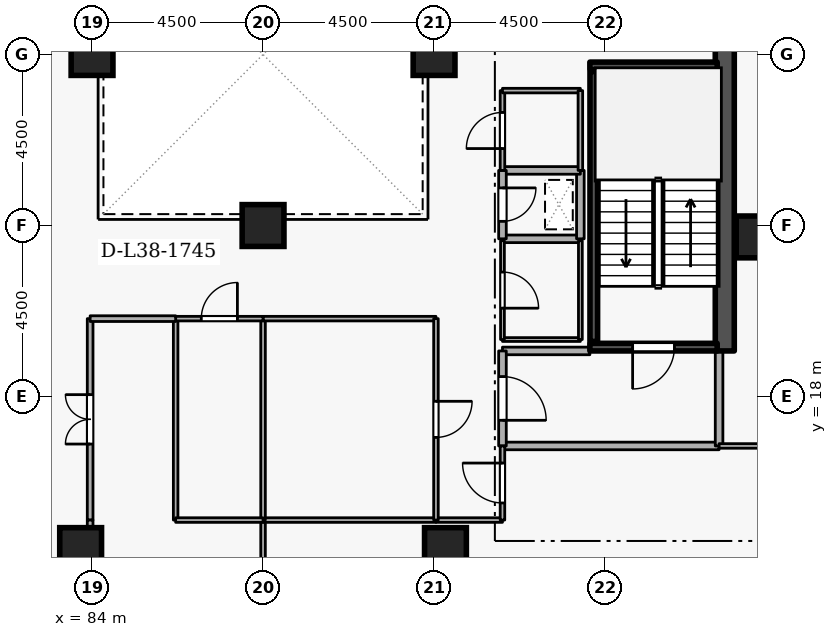
"""IFC4 building model, lengths in metres.
Left out: names, types, materials, properties, quantities, classifications, styles, units other than length and angle.
Written with IfcOpenShell. Run it as: python <this file> out.ifc"""

import sys

from ifc_helpers import new_model, si_unit, direction, frame, frame_2d, origin, origin_2d, place, context, subcontext, project, spatial, rectangle, extrude, element, fill, save


model = new_model("IFC4")
c1 = context("Model", 3, precision=1e-05, world=origin(), true_north=direction((0.0, 1.0)))
c2 = subcontext(c1, "Body", "Model", "MODEL_VIEW")
j1 = project(units=[si_unit("LENGTHUNIT", "METRE"), si_unit("PLANEANGLEUNIT", "RADIAN")], contexts=[c1])
p1 = place(None, origin())
s1 = spatial("IfcSite", under=j1, at=p1, CompositionType="ELEMENT")
p2 = place(p1, origin())
s2 = spatial("IfcBuilding", under=s1, at=p2, CompositionType="ELEMENT")
p3 = place(p2, frame((0.0, 0.0, 145.5)))
s3 = spatial("IfcBuildingStorey", under=s2, at=p3, CompositionType="ELEMENT", Elevation=145.5)
p4 = place(p3, frame((100.65, 19.2, 0.0), z_axis=(0.0, 0.0, 1.0), x_axis=(0.0, 1.0, 0.0)))
e1 = element("IfcWall", 1, at=p4, inside=s3, PredefinedType="SHEAR", context=c2, shape_type="SweptSolid", body=[
    extrude(rectangle(XDim=15.6, YDim=0.5, at=frame_2d((7.8, 0.0))), origin(), (0.0, 0.0, 1.0), 3.6),
])
for number, where, z_axis, x_axis in (
    (2, (93.3, 14.0, 0.0), (0.0, 0.0, 1.0), (1.0, 0.0, 0.0)),
    (3, (83.7, 14.0, 0.0), (0.0, 0.0, 1.0), (1.0, 0.0, 0.0)),
    (4, (101.5, 22.2, 0.0), (0.0, 0.0, 1.0), (1.0, 0.0, 0.0)),
    (5, (93.0, 27.0, 0.0), (0.0, 0.0, 1.0), (1.0, 0.0, 0.0)),
    (6, (84.0, 27.0, 0.0), (0.0, 0.0, 1.0), (1.0, 0.0, 0.0)),
    (7, (88.5, 22.5, 0.0), (0.0, 0.0, 1.0), (1.0, 0.0, 0.0)),
):
    element("IfcColumn", number, at=place(p3, frame(where, z_axis=z_axis, x_axis=x_axis)), inside=s3, PredefinedType="COLUMN", context=c2, shape_type="SweptSolid", body=[
        extrude(rectangle(XDim=1.1, YDim=1.1, at=origin_2d()), origin(), (0.0, 0.0, 1.0), 3.6),
    ])
p5 = place(p3, frame((100.45, 19.3, 0.0), z_axis=(0.0, 0.0, 1.0), x_axis=(-1.0, 0.0, 0.0)))
e8 = element("IfcWall", 8, at=p5, inside=s3, PredefinedType="SHEAR", context=c2, shape_type="SweptSolid", body=[
    extrude(rectangle(XDim=3.35, YDim=0.2, at=frame_2d((1.675, 0.0))), origin(), (0.0, 0.0, 1.0), 3.6),
])
p6 = place(p5, frame((1.125, 0.0, 0.0)))
e9 = element("IfcOpeningElement", 9, at=p6, cuts=e8, PredefinedType="OPENING", context=c2, shape_type="SweptSolid", body=[
    extrude(rectangle(XDim=1.1, YDim=2.1, at=frame_2d((0.55, 1.05))), frame((0.0, 0.11, 0.0), z_axis=(0.0, -1.0, 0.0), x_axis=(1.0, 0.0, 0.0)), (0.0, 0.0, 1.0), 0.22),
])
p7 = place(p3, frame((97.1, 26.7, 0.0), z_axis=(0.0, 0.0, 1.0), x_axis=(1.0, 0.0, 0.0)))
e10 = element("IfcWall", 10, at=p7, inside=s3, PredefinedType="SHEAR", context=c2, shape_type="SweptSolid", body=[
    extrude(rectangle(XDim=3.35, YDim=0.2, at=frame_2d((1.675, 0.0))), origin(), (0.0, 0.0, 1.0), 3.6),
])
p8 = place(p3, frame((97.203, 26.55, 0.0), z_axis=(0.0, 0.0, 1.0), x_axis=(0.0, -1.0, 0.0)))
e11 = element("IfcWall", 11, at=p8, inside=s3, PredefinedType="SHEAR", context=c2, shape_type="SweptSolid", body=[
    extrude(rectangle(XDim=7.1, YDim=0.2, at=frame_2d((3.55, 0.0))), origin(), (0.0, 0.0, 1.0), 3.6),
])
p9 = place(p3, frame((94.8, 16.7, 0.0), z_axis=(0.0, 0.0, 1.0), x_axis=(1.0, 0.0, 0.0)))
e12 = element("IfcWall", 12, at=p9, inside=s3, PredefinedType="STANDARD", context=c2, shape_type="SweptSolid", body=[
    extrude(rectangle(XDim=5.7, YDim=0.2, at=frame_2d((2.85, 0.0))), origin(), (0.0, 0.0, 1.0), 3.3),
])
p10 = place(p3, frame((100.5, 16.7, 0.0), z_axis=(0.0, 0.0, 1.0), x_axis=(0.0, 1.0, 0.0)))
e13 = element("IfcWall", 13, at=p10, inside=s3, PredefinedType="STANDARD", context=c2, shape_type="SweptSolid", body=[
    extrude(rectangle(XDim=2.5, YDim=0.2, at=frame_2d((1.25, 0.0))), origin(), (0.0, 0.0, 1.0), 3.3),
])
p11 = place(p3, frame((97.1, 19.2, 0.0), z_axis=(0.0, 0.0, 1.0), x_axis=(-1.0, 0.0, 0.0)))
e14 = element("IfcWall", 14, at=p11, inside=s3, PredefinedType="STANDARD", context=c2, shape_type="SweptSolid", body=[
    extrude(rectangle(XDim=2.3, YDim=0.2, at=frame_2d((1.15, 0.0))), origin(), (0.0, 0.0, 1.0), 2.505),
])
p12 = place(p3, frame((94.8, 19.2, 0.0), z_axis=(0.0, 0.0, 1.0), x_axis=(0.0, -1.0, 0.0)))
e15 = element("IfcWall", 15, at=p12, inside=s3, PredefinedType="STANDARD", context=c2, shape_type="SweptSolid", body=[
    extrude(rectangle(XDim=2.5, YDim=0.2, at=frame_2d((1.25, 0.0))), origin(), (0.0, 0.0, 1.0), 3.3),
])
p13 = place(p12, frame((0.675, 0.0, 0.0)))
e16 = element("IfcOpeningElement", 16, at=p13, cuts=e15, PredefinedType="OPENING", context=c2, shape_type="SweptSolid", body=[
    extrude(rectangle(XDim=1.15, YDim=2.1, at=frame_2d((0.575, 1.05))), frame((0.0, 0.11, 0.0), z_axis=(0.0, -1.0, 0.0), x_axis=(1.0, 0.0, 0.0)), (0.0, 0.0, 1.0), 0.22),
])
p14 = place(p3, frame((94.8, 22.15, 0.0), z_axis=(0.0, 0.0, 1.0), x_axis=(1.0, 0.0, 0.0)))
e17 = element("IfcWall", 17, at=p14, inside=s3, PredefinedType="STANDARD", context=c2, shape_type="SweptSolid", body=[
    extrude(rectangle(XDim=2.05, YDim=0.2, at=frame_2d((1.025, 0.0))), origin(), (0.0, 0.0, 1.0), 3.3),
])
p15 = place(p3, frame((96.85, 22.15, 0.0), z_axis=(0.0, 0.0, 1.0), x_axis=(0.0, 1.0, 0.0)))
e18 = element("IfcWall", 18, at=p15, inside=s3, PredefinedType="STANDARD", context=c2, shape_type="SweptSolid", body=[
    extrude(rectangle(XDim=1.8, YDim=0.2, at=frame_2d((0.9, 0.0))), origin(), (0.0, 0.0, 1.0), 3.3),
])
p16 = place(p3, frame((96.85, 23.95, 0.0), z_axis=(0.0, 0.0, 1.0), x_axis=(-1.0, 0.0, 0.0)))
e19 = element("IfcWall", 19, at=p16, inside=s3, PredefinedType="STANDARD", context=c2, shape_type="SweptSolid", body=[
    extrude(rectangle(XDim=2.05, YDim=0.2, at=frame_2d((1.025, 0.0))), origin(), (0.0, 0.0, 1.0), 3.3),
])
p17 = place(p3, frame((94.8, 23.95, 0.0), z_axis=(0.0, 0.0, 1.0), x_axis=(0.0, -1.0, 0.0)))
e20 = element("IfcWall", 20, at=p17, inside=s3, PredefinedType="STANDARD", context=c2, shape_type="SweptSolid", body=[
    extrude(rectangle(XDim=1.8, YDim=0.2, at=frame_2d((0.9, 0.0))), origin(), (0.0, 0.0, 1.0), 3.3),
])
p18 = place(p17, frame((0.46, 0.0, 0.0)))
e21 = element("IfcOpeningElement", 21, at=p18, cuts=e20, PredefinedType="OPENING", context=c2, shape_type="SweptSolid", body=[
    extrude(rectangle(XDim=0.88, YDim=2.04, at=frame_2d((0.44, 1.02))), frame((0.0, 0.11, 0.0), z_axis=(0.0, -1.0, 0.0), x_axis=(1.0, 0.0, 0.0)), (0.0, 0.0, 1.0), 0.22),
])
p19 = place(p3, frame((94.8, 19.5, 0.0), z_axis=(0.0, 0.0, 1.0), x_axis=(1.0, 0.0, 0.0)))
e22 = element("IfcWall", 22, at=p19, inside=s3, PredefinedType="PARTITIONING", context=c2, shape_type="SweptSolid", body=[
    extrude(rectangle(XDim=2.05, YDim=0.1, at=frame_2d((1.025, 0.0))), origin(), (0.0, 0.0, 1.0), 2.505),
])
p20 = place(p3, frame((96.85, 19.5, 0.0), z_axis=(0.0, 0.0, 1.0), x_axis=(0.0, 1.0, 0.0)))
e23 = element("IfcWall", 23, at=p20, inside=s3, PredefinedType="PARTITIONING", context=c2, shape_type="SweptSolid", body=[
    extrude(rectangle(XDim=2.6, YDim=0.1, at=frame_2d((1.3, 0.0))), origin(), (0.0, 0.0, 1.0), 3.3),
])
p21 = place(p3, frame((94.8, 22.1, 0.0), z_axis=(0.0, 0.0, 1.0), x_axis=(0.0, -1.0, 0.0)))
e24 = element("IfcWall", 24, at=p21, inside=s3, PredefinedType="PARTITIONING", context=c2, shape_type="SweptSolid", body=[
    extrude(rectangle(XDim=2.6, YDim=0.1, at=frame_2d((1.3, 0.0))), origin(), (0.0, 0.0, 1.0), 3.3),
])
p22 = place(p21, frame((0.825, 0.0, 0.0)))
e25 = element("IfcOpeningElement", 25, at=p22, cuts=e24, PredefinedType="OPENING", context=c2, shape_type="SweptSolid", body=[
    extrude(rectangle(XDim=0.95, YDim=2.1, at=frame_2d((0.475, 1.05))), frame((0.0, 0.06, 0.0), z_axis=(0.0, -1.0, 0.0), x_axis=(1.0, 0.0, 0.0)), (0.0, 0.0, 1.0), 0.12),
])
p23 = place(p3, frame((94.8, 23.95, 0.0), z_axis=(0.0, 0.0, 1.0), x_axis=(0.0, 1.0, 0.0)))
e26 = element("IfcWall", 26, at=p23, inside=s3, PredefinedType="PARTITIONING", context=c2, shape_type="SweptSolid", body=[
    extrude(rectangle(XDim=2.1, YDim=0.12, at=frame_2d((1.05, 0.0))), origin(), (0.0, 0.0, 1.0), 3.3),
])
p24 = place(p23, frame((0.575, 0.0, 0.0)))
e27 = element("IfcOpeningElement", 27, at=p24, cuts=e26, PredefinedType="OPENING", context=c2, shape_type="SweptSolid", body=[
    extrude(rectangle(XDim=0.95, YDim=2.1, at=frame_2d((0.475, 1.05))), frame((0.0, 0.07, 0.0), z_axis=(0.0, -1.0, 0.0), x_axis=(1.0, 0.0, 0.0)), (0.0, 0.0, 1.0), 0.14),
])
p25 = place(p3, frame((94.8, 26.05, 0.0), z_axis=(0.0, 0.0, 1.0), x_axis=(1.0, 0.0, 0.0)))
e28 = element("IfcWall", 28, at=p25, inside=s3, PredefinedType="PARTITIONING", context=c2, shape_type="SweptSolid", body=[
    extrude(rectangle(XDim=2.05, YDim=0.12, at=frame_2d((1.025, 0.0))), origin(), (0.0, 0.0, 1.0), 3.3),
])
p26 = place(p3, frame((96.85, 26.05, 0.0), z_axis=(0.0, 0.0, 1.0), x_axis=(0.0, -1.0, 0.0)))
e29 = element("IfcWall", 29, at=p26, inside=s3, PredefinedType="PARTITIONING", context=c2, shape_type="SweptSolid", body=[
    extrude(rectangle(XDim=2.1, YDim=0.12, at=frame_2d((1.05, 0.0))), origin(), (0.0, 0.0, 1.0), 3.3),
])
p27 = place(p3, frame((88.5, 3.28, 0.0), z_axis=(0.0, 0.0, 1.0), x_axis=(0.0, 1.0, 0.0)))
e30 = element("IfcWall", 30, at=p27, inside=s3, PredefinedType="PARTITIONING", context=c2, shape_type="SweptSolid", body=[
    extrude(rectangle(XDim=11.47, YDim=0.12, at=frame_2d((5.735, 0.0))), origin(), (0.0, 0.0, 1.0), 2.842),
])
p28 = place(p3, frame((88.5, 14.75, 0.0), z_axis=(0.0, 0.0, 1.0), x_axis=(1.0, 0.0, 0.0)))
e31 = element("IfcWall", 31, at=p28, inside=s3, PredefinedType="PARTITIONING", context=c2, shape_type="SweptSolid", body=[
    extrude(rectangle(XDim=4.55, YDim=0.12, at=frame_2d((2.275, 0.0))), origin(), (0.0, 0.0, 1.0), 3.3),
])
p29 = place(p3, frame((93.05, 14.75, 0.0), z_axis=(0.0, 0.0, 1.0), x_axis=(1.0, 0.0, 0.0)))
e32 = element("IfcWall", 32, at=p29, inside=s3, PredefinedType="PARTITIONING", context=c2, shape_type="SweptSolid", body=[
    extrude(rectangle(XDim=1.75, YDim=0.12, at=frame_2d((0.875, 0.0))), origin(), (0.0, 0.0, 1.0), 3.3),
])
p30 = place(p3, frame((94.8, 14.75, 0.0), z_axis=(0.0, 0.0, 1.0), x_axis=(0.0, 1.0, 0.0)))
e33 = element("IfcWall", 33, at=p30, inside=s3, PredefinedType="PARTITIONING", context=c2, shape_type="SweptSolid", body=[
    extrude(rectangle(XDim=1.95, YDim=0.12, at=frame_2d((0.975, 0.0))), origin(), (0.0, 0.0, 1.0), 3.3),
])
p31 = place(p30, frame((0.45, 0.0, 0.0)))
e34 = element("IfcOpeningElement", 34, at=p31, cuts=e33, PredefinedType="OPENING", context=c2, shape_type="SweptSolid", body=[
    extrude(rectangle(XDim=1.05, YDim=2.1, at=frame_2d((0.525, 1.05))), frame((0.0, 0.07, 0.0), z_axis=(0.0, -1.0, 0.0), x_axis=(1.0, 0.0, 0.0)), (0.0, 0.0, 1.0), 0.14),
])
p32 = place(p3, frame((100.5, 16.7, 0.0), z_axis=(0.0, 0.0, 1.0), x_axis=(1.0, 0.0, 0.0)))
e35 = element("IfcWall", 35, at=p32, inside=s3, PredefinedType="PARTITIONING", context=c2, shape_type="SweptSolid", body=[
    extrude(rectangle(XDim=11.72, YDim=0.12, at=frame_2d((5.86, 0.0))), origin(), (0.0, 0.0, 1.0), 3.3),
])
p33 = place(p3, frame((88.5, 14.75, 0.0), z_axis=(0.0, 0.0, 1.0), x_axis=(0.0, 1.0, 0.0)))
e36 = element("IfcWall", 36, at=p33, inside=s3, PredefinedType="PARTITIONING", context=c2, shape_type="SweptSolid", body=[
    extrude(rectangle(XDim=5.3, YDim=0.12, at=frame_2d((2.65, 0.0))), origin(), (0.0, 0.0, 1.0), 3.3),
])
p34 = place(p3, frame((88.5, 20.05, 0.0), z_axis=(0.0, 0.0, 1.0), x_axis=(1.0, 0.0, 0.0)))
e37 = element("IfcWall", 37, at=p34, inside=s3, PredefinedType="PARTITIONING", context=c2, shape_type="SweptSolid", body=[
    extrude(rectangle(XDim=4.55, YDim=0.12, at=frame_2d((2.275, 0.0))), origin(), (0.0, 0.0, 1.0), 3.3),
])
p35 = place(p3, frame((93.05, 20.05, 0.0), z_axis=(0.0, 0.0, 1.0), x_axis=(0.0, -1.0, 0.0)))
e38 = element("IfcWall", 38, at=p35, inside=s3, PredefinedType="PARTITIONING", context=c2, shape_type="SweptSolid", body=[
    extrude(rectangle(XDim=5.3, YDim=0.12, at=frame_2d((2.65, 0.0))), origin(), (0.0, 0.0, 1.0), 3.3),
])
p36 = place(p35, frame((2.175, 0.0, 0.0)))
e39 = element("IfcOpeningElement", 39, at=p36, cuts=e38, PredefinedType="OPENING", context=c2, shape_type="SweptSolid", body=[
    extrude(rectangle(XDim=0.95, YDim=2.1, at=frame_2d((0.475, 1.05))), frame((0.0, 0.07, 0.0), z_axis=(0.0, -1.0, 0.0), x_axis=(1.0, 0.0, 0.0)), (0.0, 0.0, 1.0), 0.14),
])
p37 = place(p3, frame((86.2, 14.75, 0.0), z_axis=(0.0, 0.0, 1.0), x_axis=(0.0, 1.0, 0.0)))
e40 = element("IfcWall", 40, at=p37, inside=s3, PredefinedType="PARTITIONING", context=c2, shape_type="SweptSolid", body=[
    extrude(rectangle(XDim=5.3, YDim=0.12, at=frame_2d((2.65, 0.0))), origin(), (0.0, 0.0, 1.0), 3.3),
])
p38 = place(p3, frame((86.2, 20.05, 0.0), z_axis=(0.0, 0.0, 1.0), x_axis=(1.0, 0.0, 0.0)))
e41 = element("IfcWall", 41, at=p38, inside=s3, PredefinedType="PARTITIONING", context=c2, shape_type="SweptSolid", body=[
    extrude(rectangle(XDim=2.3, YDim=0.12, at=frame_2d((1.15, 0.0))), origin(), (0.0, 0.0, 1.0), 3.3),
])
p39 = place(p38, frame((0.675, 0.0, 0.0)))
e42 = element("IfcOpeningElement", 42, at=p39, cuts=e41, PredefinedType="OPENING", context=c2, shape_type="SweptSolid", body=[
    extrude(rectangle(XDim=0.95, YDim=2.1, at=frame_2d((0.475, 1.05))), frame((0.0, 0.07, 0.0), z_axis=(0.0, -1.0, 0.0), x_axis=(1.0, 0.0, 0.0)), (0.0, 0.0, 1.0), 0.14),
])
p40 = place(p3, frame((88.5, 14.75, 0.0), z_axis=(0.0, 0.0, 1.0), x_axis=(-1.0, 0.0, 0.0)))
e43 = element("IfcWall", 43, at=p40, inside=s3, PredefinedType="PARTITIONING", context=c2, shape_type="SweptSolid", body=[
    extrude(rectangle(XDim=2.3, YDim=0.12, at=frame_2d((1.15, 0.0))), origin(), (0.0, 0.0, 1.0), 3.3),
])
p41 = place(p3, frame((83.95, 14.75, 0.0), z_axis=(0.0, 0.0, 1.0), x_axis=(0.0, 1.0, 0.0)))
e44 = element("IfcWall", 44, at=p41, inside=s3, PredefinedType="PARTITIONING", context=c2, shape_type="SweptSolid", body=[
    extrude(rectangle(XDim=5.3, YDim=0.15, at=frame_2d((2.65, 0.0))), origin(), (0.0, 0.0, 1.0), 3.3),
])
p42 = place(p41, frame((2.0, 0.0, 0.0)))
e45 = element("IfcOpeningElement", 45, at=p42, cuts=e44, PredefinedType="OPENING", context=c2, shape_type="SweptSolid", body=[
    extrude(rectangle(XDim=1.3, YDim=2.12, at=frame_2d((0.65, 1.06))), frame((0.0, 0.085, 0.0), z_axis=(0.0, -1.0, 0.0), x_axis=(1.0, 0.0, 0.0)), (0.0, 0.0, 1.0), 0.17),
])
p43 = place(p3, frame((83.95, 20.05, 0.0), z_axis=(0.0, 0.0, 1.0), x_axis=(1.0, 0.0, 0.0)))
e46 = element("IfcWall", 46, at=p43, inside=s3, PredefinedType="PARTITIONING", context=c2, shape_type="SweptSolid", body=[
    extrude(rectangle(XDim=2.25, YDim=0.15, at=frame_2d((1.125, 0.0))), origin(), (0.0, 0.0, 1.0), 3.3),
])
p44 = place(p3, frame((83.95, 12.4, 0.0), z_axis=(0.0, 0.0, 1.0), x_axis=(0.0, 1.0, 0.0)))
e47 = element("IfcWall", 47, at=p44, inside=s3, PredefinedType="PARTITIONING", context=c2, shape_type="SweptSolid", body=[
    extrude(rectangle(XDim=2.35, YDim=0.15, at=frame_2d((1.175, 0.0))), origin(), (0.0, 0.0, 1.0), 3.3),
])
p45 = place(p6, origin())
e48 = element("IfcDoor", 48, at=p45, inside=s3, OperationType="SINGLE_SWING_RIGHT", PredefinedType="DOOR", context=c2, shape_type="SweptSolid", body=[
    extrude(rectangle(XDim=1.1, YDim=2.1, at=frame_2d((0.55, 1.05))), frame((0.0, 0.025, 0.0), z_axis=(0.0, -1.0, 0.0), x_axis=(1.0, 0.0, 0.0)), (0.0, 0.0, 1.0), 0.05),
])
fill(e9, e48)
p46 = place(p13, origin())
e49 = element("IfcDoor", 49, at=p46, inside=s3, OperationType="SINGLE_SWING_RIGHT", PredefinedType="DOOR", context=c2, shape_type="SweptSolid", body=[
    extrude(rectangle(XDim=1.15, YDim=2.1, at=frame_2d((0.575, 1.05))), frame((0.0, 0.025, 0.0), z_axis=(0.0, -1.0, 0.0), x_axis=(1.0, 0.0, 0.0)), (0.0, 0.0, 1.0), 0.05),
])
fill(e16, e49)
p47 = place(p18, origin())
e50 = element("IfcDoor", 50, at=p47, inside=s3, OperationType="SINGLE_SWING_LEFT", PredefinedType="DOOR", context=c2, shape_type="SweptSolid", body=[
    extrude(rectangle(XDim=0.88, YDim=2.04, at=frame_2d((0.44, 1.02))), frame((0.0, 0.025, 0.0), z_axis=(0.0, -1.0, 0.0), x_axis=(1.0, 0.0, 0.0)), (0.0, 0.0, 1.0), 0.05),
])
fill(e21, e50)
p48 = place(p22, origin())
e51 = element("IfcDoor", 51, at=p48, inside=s3, OperationType="SINGLE_SWING_RIGHT", PredefinedType="DOOR", context=c2, shape_type="SweptSolid", body=[
    extrude(rectangle(XDim=0.95, YDim=2.1, at=frame_2d((0.475, 1.05))), frame((0.0, 0.025, 0.0), z_axis=(0.0, -1.0, 0.0), x_axis=(1.0, 0.0, 0.0)), (0.0, 0.0, 1.0), 0.05),
])
fill(e25, e51)
p49 = place(p24, origin())
e52 = element("IfcDoor", 52, at=p49, inside=s3, OperationType="SINGLE_SWING_LEFT", PredefinedType="DOOR", context=c2, shape_type="SweptSolid", body=[
    extrude(rectangle(XDim=0.95, YDim=2.1, at=frame_2d((0.475, 1.05))), frame((0.0, 0.025, 0.0), z_axis=(0.0, -1.0, 0.0), x_axis=(1.0, 0.0, 0.0)), (0.0, 0.0, 1.0), 0.05),
])
fill(e27, e52)
p50 = place(p31, origin())
e53 = element("IfcDoor", 53, at=p50, inside=s3, OperationType="SINGLE_SWING_RIGHT", PredefinedType="DOOR", context=c2, shape_type="SweptSolid", body=[
    extrude(rectangle(XDim=1.05, YDim=2.1, at=frame_2d((0.525, 1.05))), frame((0.0, 0.025, 0.0), z_axis=(0.0, -1.0, 0.0), x_axis=(1.0, 0.0, 0.0)), (0.0, 0.0, 1.0), 0.05),
])
fill(e34, e53)
p51 = place(p36, origin())
e54 = element("IfcDoor", 54, at=p51, inside=s3, OperationType="SINGLE_SWING_LEFT", PredefinedType="DOOR", context=c2, shape_type="SweptSolid", body=[
    extrude(rectangle(XDim=0.95, YDim=2.1, at=frame_2d((0.475, 1.05))), frame((0.0, 0.025, 0.0), z_axis=(0.0, -1.0, 0.0), x_axis=(1.0, 0.0, 0.0)), (0.0, 0.0, 1.0), 0.05),
])
fill(e39, e54)
p52 = place(p39, origin())
e55 = element("IfcDoor", 55, at=p52, inside=s3, OperationType="SINGLE_SWING_RIGHT", PredefinedType="DOOR", context=c2, shape_type="SweptSolid", body=[
    extrude(rectangle(XDim=0.95, YDim=2.1, at=frame_2d((0.475, 1.05))), frame((0.0, 0.025, 0.0), z_axis=(0.0, -1.0, 0.0), x_axis=(1.0, 0.0, 0.0)), (0.0, 0.0, 1.0), 0.05),
])
fill(e42, e55)
p53 = place(p42, origin())
e56 = element("IfcDoor", 56, at=p53, inside=s3, OperationType="DOUBLE_DOOR_SINGLE_SWING", PredefinedType="DOOR", context=c2, shape_type="SweptSolid", body=[
    extrude(rectangle(XDim=1.3, YDim=2.12, at=frame_2d((0.65, 1.06))), frame((0.0, 0.025, 0.0), z_axis=(0.0, -1.0, 0.0), x_axis=(1.0, 0.0, 0.0)), (0.0, 0.0, 1.0), 0.05),
])
fill(e45, e56)
save(model, sys.argv[1])
